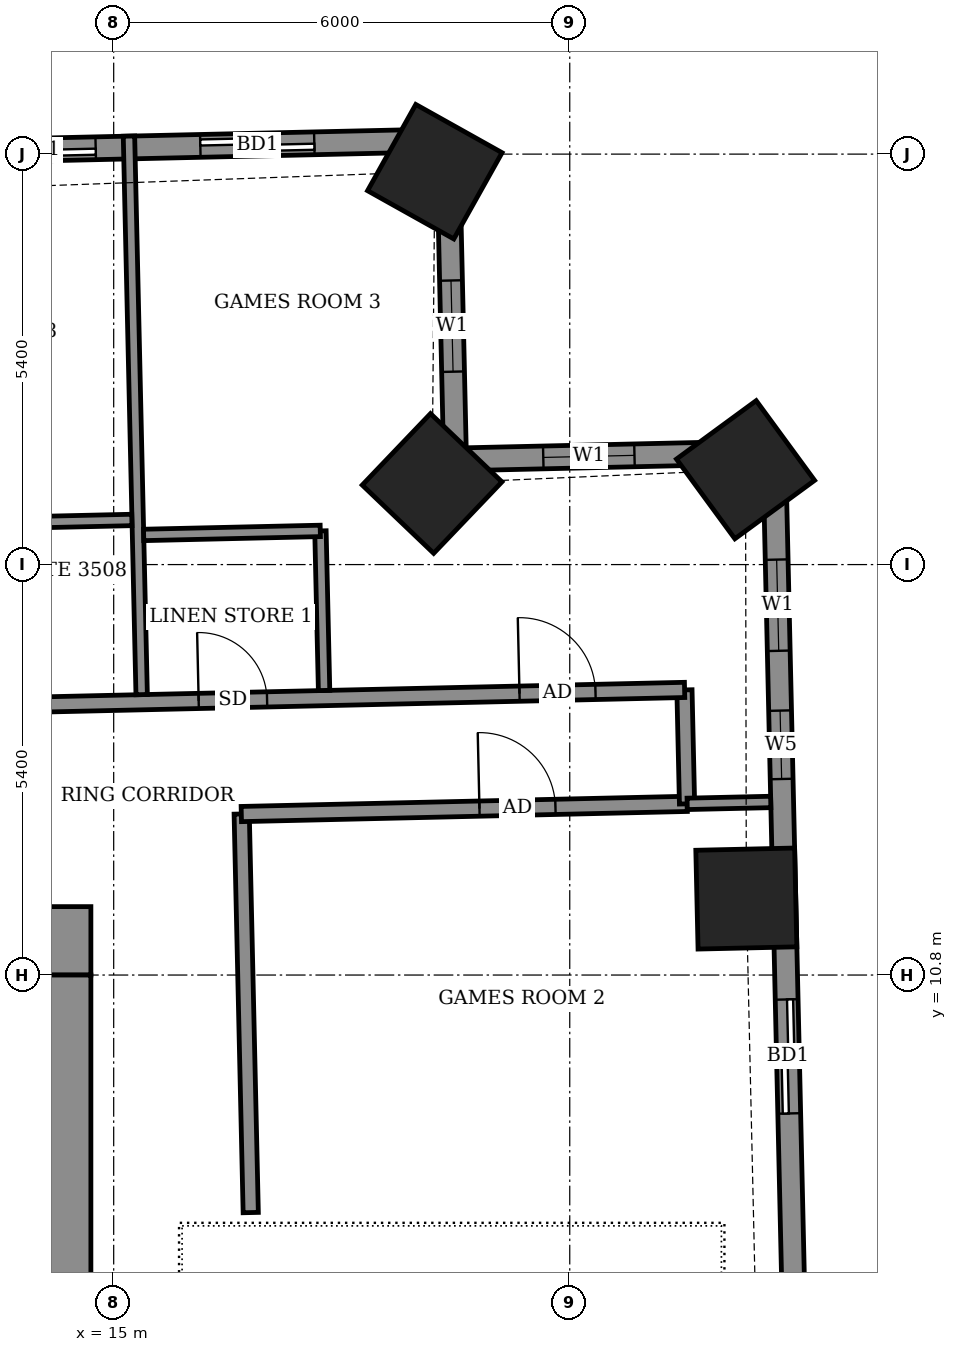
"""IFC4 building model, lengths in metres.
Left out: names, types, materials, properties, quantities, classifications, styles, units other than length and angle.
Written with IfcOpenShell. Run it as: python <this file> out.ifc"""

import sys

from ifc_helpers import new_model, si_unit, direction, frame, frame_2d, origin, origin_2d, place, context, subcontext, project, spatial, rectangle, extrude, element, fill, save


model = new_model("IFC4")
c1 = context("Model", 3, precision=1e-05, world=origin(), true_north=direction((0.0, 1.0)))
c2 = subcontext(c1, "Body", "Model", "MODEL_VIEW")
j1 = project(units=[si_unit("LENGTHUNIT", "METRE"), si_unit("PLANEANGLEUNIT", "RADIAN")], contexts=[c1])
p1 = place(None, origin())
s1 = spatial("IfcSite", under=j1, at=p1, CompositionType="ELEMENT")
p2 = place(p1, origin())
s2 = spatial("IfcBuilding", under=s1, at=p2, CompositionType="ELEMENT")
p3 = place(p2, frame((0.0, 0.0, 140.9)))
s3 = spatial("IfcBuildingStorey", under=s2, at=p3, CompositionType="ELEMENT", Elevation=140.9)
for number, where, z_axis, x_axis in (
    (1, (23.323, 11.806, -0.55), (0.0, 0.0, 1.0), (-0.023, 1.0, 0.0)),
    (2, (23.313, 17.448, -0.55), (0.0, 0.0, 1.0), (-0.591, 0.807, 0.0)),
    (3, (19.189, 17.267, -0.55), (0.0, 0.0, 1.0), (-0.723, 0.691, 0.0)),
    (4, (19.225, 21.369, -0.55), (0.0, 0.0, 1.0), (-0.873, 0.488, 0.0)),
):
    element("IfcColumn", number, at=place(p3, frame(where, z_axis=z_axis, x_axis=x_axis)), inside=s3, PredefinedType="COLUMN", context=c2, shape_type="SweptSolid", body=[
        extrude(rectangle(XDim=1.3, YDim=1.3, at=origin_2d()), origin(), (0.0, 0.0, 1.0), 3.6),
    ])
p4 = place(p3, frame((23.961, 5.752, 0.0), z_axis=(0.0, 0.0, 1.0), x_axis=(-0.022715362207, 0.999741972871, 0.0)))
e5 = element("IfcWall", 5, at=p4, inside=s3, PredefinedType="SOLIDWALL", context=c2, shape_type="SweptSolid", body=[
    extrude(rectangle(XDim=11.93, YDim=0.3, at=frame_2d((5.965, 0.0))), origin(), (0.0, 0.0, 1.0), 3.05),
])
p5 = place(p4, frame((3.228, 0.0, 0.0)))
e6 = element("IfcOpeningElement", 6, at=p5, cuts=e5, PredefinedType="OPENING", context=c2, shape_type="SweptSolid", body=[
    extrude(rectangle(XDim=1.5, YDim=2.4, at=frame_2d((0.75, 1.2))), frame((0.0, 0.16, 0.0), z_axis=(0.0, -1.0, 0.0), x_axis=(1.0, 0.0, 0.0)), (0.0, 0.0, 1.0), 0.32),
])
p6 = place(p4, frame((7.629, 0.0, 0.9)))
e7 = element("IfcOpeningElement", 7, at=p6, cuts=e5, PredefinedType="OPENING", context=c2, shape_type="SweptSolid", body=[
    extrude(rectangle(XDim=0.9, YDim=1.5, at=frame_2d((0.45, 0.75))), frame((0.0, 0.16, 0.0), z_axis=(0.0, -1.0, 0.0), x_axis=(1.0, 0.0, 0.0)), (0.0, 0.0, 1.0), 0.32),
])
p7 = place(p4, frame((9.316, 0.0, 0.9)))
e8 = element("IfcOpeningElement", 8, at=p7, cuts=e5, PredefinedType="OPENING", context=c2, shape_type="SweptSolid", body=[
    extrude(rectangle(XDim=1.2, YDim=1.5, at=frame_2d((0.6, 0.75))), frame((0.0, 0.16, 0.0), z_axis=(0.0, -1.0, 0.0), x_axis=(1.0, 0.0, 0.0)), (0.0, 0.0, 1.0), 0.32),
])
p8 = place(p3, frame((23.69, 17.679, 0.0), z_axis=(0.0, 0.0, 1.0), x_axis=(-0.999739037152, -0.022844202663, 0.0)))
e9 = element("IfcWall", 9, at=p8, inside=s3, PredefinedType="SOLIDWALL", context=c2, shape_type="SweptSolid", body=[
    extrude(rectangle(XDim=4.2, YDim=0.3, at=frame_2d((2.1, 0.0))), origin(), (0.0, 0.0, 1.0), 2.55),
])
p9 = place(p8, frame((1.839, 0.0, 0.9)))
e10 = element("IfcOpeningElement", 10, at=p9, cuts=e9, PredefinedType="OPENING", context=c2, shape_type="SweptSolid", body=[
    extrude(rectangle(XDim=1.2, YDim=1.5, at=frame_2d((0.6, 0.75))), frame((0.0, 0.16, 0.0), z_axis=(0.0, -1.0, 0.0), x_axis=(1.0, 0.0, 0.0)), (0.0, 0.0, 1.0), 0.32),
])
p10 = place(p3, frame((19.491, 17.583, 0.0), z_axis=(0.0, 0.0, 1.0), x_axis=(-0.022611811187, 0.999744320311, 0.0)))
e11 = element("IfcWall", 11, at=p10, inside=s3, PredefinedType="SOLIDWALL", context=c2, shape_type="SweptSolid", body=[
    extrude(rectangle(XDim=4.2, YDim=0.3, at=frame_2d((2.1, 0.0))), origin(), (0.0, 0.0, 1.0), 2.55),
])
p11 = place(p10, frame((1.155, 0.0, 0.9)))
e12 = element("IfcOpeningElement", 12, at=p11, cuts=e11, PredefinedType="OPENING", context=c2, shape_type="SweptSolid", body=[
    extrude(rectangle(XDim=1.2, YDim=1.5, at=frame_2d((0.6, 0.75))), frame((0.0, 0.16, 0.0), z_axis=(0.0, -1.0, 0.0), x_axis=(1.0, 0.0, 0.0)), (0.0, 0.0, 1.0), 0.32),
])
p12 = place(p3, frame((19.396, 21.782, 0.0), z_axis=(0.0, 0.0, 1.0), x_axis=(-0.999742636707, -0.022686126826, 0.0)))
e13 = element("IfcWall", 13, at=p12, inside=s3, PredefinedType="SOLIDWALL", context=c2, shape_type="SweptSolid", body=[
    extrude(rectangle(XDim=42.444, YDim=0.3, at=frame_2d((21.222, 0.0))), origin(), (0.0, 0.0, 1.0), 3.05),
])
p13 = place(p12, frame((1.757, 0.0, 0.0)))
e14 = element("IfcOpeningElement", 14, at=p13, cuts=e13, PredefinedType="OPENING", context=c2, shape_type="SweptSolid", body=[
    extrude(rectangle(XDim=1.5, YDim=2.4, at=frame_2d((0.75, 1.2))), frame((0.0, 0.16, 0.0), z_axis=(0.0, -1.0, 0.0), x_axis=(1.0, 0.0, 0.0)), (0.0, 0.0, 1.0), 0.32),
])
p14 = place(p12, frame((4.634, 0.0, 0.0)))
e15 = element("IfcOpeningElement", 15, at=p14, cuts=e13, PredefinedType="OPENING", context=c2, shape_type="SweptSolid", body=[
    extrude(rectangle(XDim=1.5, YDim=2.4, at=frame_2d((0.75, 1.2))), frame((0.0, 0.16, 0.0), z_axis=(0.0, -1.0, 0.0), x_axis=(1.0, 0.0, 0.0)), (0.0, 0.0, 1.0), 0.32),
])
p15 = place(p12, frame((9.769, 0.0, 0.0)))
e16 = element("IfcOpeningElement", 16, at=p15, cuts=e13, PredefinedType="OPENING", context=c2, shape_type="SweptSolid", body=[
    extrude(rectangle(XDim=1.5, YDim=2.4, at=frame_2d((0.75, 1.2))), frame((0.0, 0.16, 0.0), z_axis=(0.0, -1.0, 0.0), x_axis=(1.0, 0.0, 0.0)), (0.0, 0.0, 1.0), 0.32),
])
p16 = place(p12, frame((14.946, 0.0, 0.0)))
e17 = element("IfcOpeningElement", 17, at=p16, cuts=e13, PredefinedType="OPENING", context=c2, shape_type="SweptSolid", body=[
    extrude(rectangle(XDim=1.5, YDim=2.4, at=frame_2d((0.75, 1.2))), frame((0.0, 0.16, 0.0), z_axis=(0.0, -1.0, 0.0), x_axis=(1.0, 0.0, 0.0)), (0.0, 0.0, 1.0), 0.32),
])
p17 = place(p12, frame((18.108, 0.0, 0.0)))
e18 = element("IfcOpeningElement", 18, at=p17, cuts=e13, PredefinedType="OPENING", context=c2, shape_type="SweptSolid", body=[
    extrude(rectangle(XDim=1.5, YDim=2.4, at=frame_2d((0.75, 1.2))), frame((0.0, 0.16, 0.0), z_axis=(0.0, -1.0, 0.0), x_axis=(1.0, 0.0, 0.0)), (0.0, 0.0, 1.0), 0.32),
])
p18 = place(p12, frame((22.733, 0.0, 0.0)))
e19 = element("IfcOpeningElement", 19, at=p18, cuts=e13, PredefinedType="OPENING", context=c2, shape_type="SweptSolid", body=[
    extrude(rectangle(XDim=1.5, YDim=2.4, at=frame_2d((0.75, 1.2))), frame((0.0, 0.16, 0.0), z_axis=(0.0, -1.0, 0.0), x_axis=(1.0, 0.0, 0.0)), (0.0, 0.0, 1.0), 0.32),
])
p19 = place(p12, frame((25.895, 0.0, 0.0)))
e20 = element("IfcOpeningElement", 20, at=p19, cuts=e13, PredefinedType="OPENING", context=c2, shape_type="SweptSolid", body=[
    extrude(rectangle(XDim=1.5, YDim=2.4, at=frame_2d((0.75, 1.2))), frame((0.0, 0.16, 0.0), z_axis=(0.0, -1.0, 0.0), x_axis=(1.0, 0.0, 0.0)), (0.0, 0.0, 1.0), 0.32),
])
p20 = place(p12, frame((30.944, 0.0, 0.0)))
e21 = element("IfcOpeningElement", 21, at=p20, cuts=e13, PredefinedType="OPENING", context=c2, shape_type="SweptSolid", body=[
    extrude(rectangle(XDim=1.5, YDim=2.4, at=frame_2d((0.75, 1.2))), frame((0.0, 0.16, 0.0), z_axis=(0.0, -1.0, 0.0), x_axis=(1.0, 0.0, 0.0)), (0.0, 0.0, 1.0), 0.32),
])
p21 = place(p12, frame((36.232, 0.0, 0.0)))
e22 = element("IfcOpeningElement", 22, at=p21, cuts=e13, PredefinedType="OPENING", context=c2, shape_type="SweptSolid", body=[
    extrude(rectangle(XDim=1.5, YDim=2.4, at=frame_2d((0.75, 1.2))), frame((0.0, 0.16, 0.0), z_axis=(0.0, -1.0, 0.0), x_axis=(1.0, 0.0, 0.0)), (0.0, 0.0, 1.0), 0.32),
])
p22 = place(p12, frame((38.612, 0.0, 0.9)))
e23 = element("IfcOpeningElement", 23, at=p22, cuts=e13, PredefinedType="OPENING", context=c2, shape_type="SweptSolid", body=[
    extrude(rectangle(XDim=2.4, YDim=1.5, at=frame_2d((1.2, 0.75))), frame((0.0, 0.16, 0.0), z_axis=(0.0, -1.0, 0.0), x_axis=(1.0, 0.0, 0.0)), (0.0, 0.0, 1.0), 0.32),
])
p23 = place(p3, frame((16.803, 7.675, 0.0), z_axis=(0.0, 0.0, 1.0), x_axis=(-0.022667483124, 0.999743059595, 0.0)))
e24 = element("IfcWall", 24, at=p23, inside=s3, PredefinedType="PARTITIONING", context=c2, shape_type="SweptSolid", body=[
    extrude(rectangle(XDim=5.245, YDim=0.2, at=frame_2d((2.623, 0.0))), origin(), (0.0, 0.0, 1.0), 3.05),
])
p24 = place(p3, frame((16.679, 12.918, 0.0), z_axis=(0.0, 0.0, 1.0), x_axis=(0.999739057042, 0.022843332181, 0.0)))
e25 = element("IfcWall", 25, at=p24, inside=s3, PredefinedType="PARTITIONING", context=c2, shape_type="SweptSolid", body=[
    extrude(rectangle(XDim=5.867, YDim=0.2, at=frame_2d((2.934, 0.0))), origin(), (0.0, 0.0, 1.0), 3.05),
])
p25 = place(p24, frame((3.134, 0.0, 0.0)))
e26 = element("IfcOpeningElement", 26, at=p25, cuts=e25, PredefinedType="OPENING", context=c2, shape_type="SweptSolid", body=[
    extrude(rectangle(XDim=1.0, YDim=2.1, at=frame_2d((0.5, 1.05))), frame((0.0, 0.11, 0.0), z_axis=(0.0, -1.0, 0.0), x_axis=(1.0, 0.0, 0.0)), (0.0, 0.0, 1.0), 0.22),
])
p26 = place(p3, frame((22.543, 13.052, 0.0), z_axis=(0.0, 0.0, 1.0), x_axis=(-0.022632637625, 0.99974384905, 0.0)))
e27 = element("IfcWall", 27, at=p26, inside=s3, PredefinedType="PARTITIONING", context=c2, shape_type="SweptSolid", body=[
    extrude(rectangle(XDim=1.5, YDim=0.2, at=frame_2d((0.75, 0.0))), origin(), (0.0, 0.0, 1.0), 3.05),
])
p27 = place(p3, frame((22.545, 13.052, 0.0), z_axis=(0.0, 0.0, 1.0), x_axis=(0.999743438074, 0.022650784248, 0.0)))
e28 = element("IfcWall", 28, at=p27, inside=s3, PredefinedType="PARTITIONING", context=c2, shape_type="SweptSolid", body=[
    extrude(rectangle(XDim=1.099, YDim=0.15, at=frame_2d((0.55, 0.0))), origin(), (0.0, 0.0, 1.0), 2.55),
])
p28 = place(p3, frame((-26.421, 13.441, 0.0), z_axis=(0.0, 0.0, 1.0), x_axis=(0.999742754064, 0.022680954485, 0.0)))
e29 = element("IfcWall", 29, at=p28, inside=s3, PredefinedType="PARTITIONING", context=c2, shape_type="SweptSolid", body=[
    extrude(rectangle(XDim=48.945, YDim=0.2, at=frame_2d((24.472, 0.0))), origin(), (0.0, 0.0, 1.0), 3.05),
])
p29 = place(p28, frame((46.772, 0.0, 0.0)))
e30 = element("IfcOpeningElement", 30, at=p29, cuts=e29, PredefinedType="OPENING", context=c2, shape_type="SweptSolid", body=[
    extrude(rectangle(XDim=1.0, YDim=2.1, at=frame_2d((0.5, 1.05))), frame((0.0, 0.11, 0.0), z_axis=(0.0, -1.0, 0.0), x_axis=(1.0, 0.0, 0.0)), (0.0, 0.0, 1.0), 0.22),
])
p30 = place(p28, frame((42.55, 0.0, 0.0)))
e31 = element("IfcOpeningElement", 31, at=p30, cuts=e29, PredefinedType="OPENING", context=c2, shape_type="SweptSolid", body=[
    extrude(rectangle(XDim=0.9, YDim=2.1, at=frame_2d((0.45, 1.05))), frame((0.0, 0.11, 0.0), z_axis=(0.0, -1.0, 0.0), x_axis=(1.0, 0.0, 0.0)), (0.0, 0.0, 1.0), 0.22),
])
p31 = place(p28, frame((38.05, 0.0, 0.0)))
e32 = element("IfcOpeningElement", 32, at=p31, cuts=e29, PredefinedType="OPENING", context=c2, shape_type="SweptSolid", body=[
    extrude(rectangle(XDim=0.9, YDim=2.1, at=frame_2d((0.45, 1.05))), frame((0.0, 0.11, 0.0), z_axis=(0.0, -1.0, 0.0), x_axis=(1.0, 0.0, 0.0)), (0.0, 0.0, 1.0), 0.22),
])
p32 = place(p28, frame((36.225, 0.0, 0.0)))
e33 = element("IfcOpeningElement", 33, at=p32, cuts=e29, PredefinedType="OPENING", context=c2, shape_type="SweptSolid", body=[
    extrude(rectangle(XDim=0.9, YDim=2.1, at=frame_2d((0.45, 1.05))), frame((0.0, 0.11, 0.0), z_axis=(0.0, -1.0, 0.0), x_axis=(1.0, 0.0, 0.0)), (0.0, 0.0, 1.0), 0.22),
])
p33 = place(p28, frame((29.575, 0.0, 0.0)))
e34 = element("IfcOpeningElement", 34, at=p33, cuts=e29, PredefinedType="OPENING", context=c2, shape_type="SweptSolid", body=[
    extrude(rectangle(XDim=0.9, YDim=2.1, at=frame_2d((0.45, 1.05))), frame((0.0, 0.11, 0.0), z_axis=(0.0, -1.0, 0.0), x_axis=(1.0, 0.0, 0.0)), (0.0, 0.0, 1.0), 0.22),
])
p34 = place(p28, frame((27.75, 0.0, 0.0)))
e35 = element("IfcOpeningElement", 35, at=p34, cuts=e29, PredefinedType="OPENING", context=c2, shape_type="SweptSolid", body=[
    extrude(rectangle(XDim=0.9, YDim=2.1, at=frame_2d((0.45, 1.05))), frame((0.0, 0.11, 0.0), z_axis=(0.0, -1.0, 0.0), x_axis=(1.0, 0.0, 0.0)), (0.0, 0.0, 1.0), 0.22),
])
p35 = place(p28, frame((21.125, 0.0, 0.0)))
e36 = element("IfcOpeningElement", 36, at=p35, cuts=e29, PredefinedType="OPENING", context=c2, shape_type="SweptSolid", body=[
    extrude(rectangle(XDim=0.9, YDim=2.1, at=frame_2d((0.45, 1.05))), frame((0.0, 0.11, 0.0), z_axis=(0.0, -1.0, 0.0), x_axis=(1.0, 0.0, 0.0)), (0.0, 0.0, 1.0), 0.22),
])
p36 = place(p28, frame((19.275, 0.0, 0.0)))
e37 = element("IfcOpeningElement", 37, at=p36, cuts=e29, PredefinedType="OPENING", context=c2, shape_type="SweptSolid", body=[
    extrude(rectangle(XDim=0.9, YDim=2.1, at=frame_2d((0.45, 1.05))), frame((0.0, 0.11, 0.0), z_axis=(0.0, -1.0, 0.0), x_axis=(1.0, 0.0, 0.0)), (0.0, 0.0, 1.0), 0.22),
])
p37 = place(p28, frame((12.65, 0.0, 0.0)))
e38 = element("IfcOpeningElement", 38, at=p37, cuts=e29, PredefinedType="OPENING", context=c2, shape_type="SweptSolid", body=[
    extrude(rectangle(XDim=0.9, YDim=2.1, at=frame_2d((0.45, 1.05))), frame((0.0, 0.11, 0.0), z_axis=(0.0, -1.0, 0.0), x_axis=(1.0, 0.0, 0.0)), (0.0, 0.0, 1.0), 0.22),
])
p38 = place(p28, frame((10.8, 0.0, 0.0)))
e39 = element("IfcOpeningElement", 39, at=p38, cuts=e29, PredefinedType="OPENING", context=c2, shape_type="SweptSolid", body=[
    extrude(rectangle(XDim=0.9, YDim=2.1, at=frame_2d((0.45, 1.05))), frame((0.0, 0.11, 0.0), z_axis=(0.0, -1.0, 0.0), x_axis=(1.0, 0.0, 0.0)), (0.0, 0.0, 1.0), 0.22),
])
p39 = place(p28, frame((1.55, 0.0, 0.0)))
e40 = element("IfcOpeningElement", 40, at=p39, cuts=e29, PredefinedType="OPENING", context=c2, shape_type="SweptSolid", body=[
    extrude(rectangle(XDim=1.0, YDim=2.1, at=frame_2d((0.5, 1.05))), frame((0.0, 0.11, 0.0), z_axis=(0.0, -1.0, 0.0), x_axis=(1.0, 0.0, 0.0)), (0.0, 0.0, 1.0), 0.22),
])
p40 = place(p28, frame((6.25, 0.0, 0.0)))
e41 = element("IfcOpeningElement", 41, at=p40, cuts=e29, PredefinedType="OPENING", context=c2, shape_type="SweptSolid", body=[
    extrude(rectangle(XDim=0.9, YDim=2.1, at=frame_2d((0.45, 1.05))), frame((0.0, 0.11, 0.0), z_axis=(0.0, -1.0, 0.0), x_axis=(1.0, 0.0, 0.0)), (0.0, 0.0, 1.0), 0.22),
])
p41 = place(p3, frame((15.368, 14.489, 0.0), z_axis=(0.0, 0.0, 1.0), x_axis=(-0.022720650804, 0.999741852694, 0.0)))
e42 = element("IfcWall", 42, at=p41, inside=s3, PredefinedType="PARTITIONING", context=c2, shape_type="SweptSolid", body=[
    extrude(rectangle(XDim=7.35, YDim=0.15, at=frame_2d((3.675, 0.0))), origin(), (0.0, 0.0, 1.0), 2.55),
])
p42 = place(p3, frame((17.768, 14.544, 0.0), z_axis=(0.0, 0.0, 1.0), x_axis=(-0.022906293375, 0.999737616439, 0.0)))
e43 = element("IfcWall", 43, at=p42, inside=s3, PredefinedType="PARTITIONING", context=c2, shape_type="SweptSolid", body=[
    extrude(rectangle(XDim=2.1, YDim=0.15, at=frame_2d((1.05, 0.0))), origin(), (0.0, 0.0, 1.0), 3.05),
])
for number, where, z_axis, x_axis in (
    (44, (15.394, 16.59, 0.0), (0.0, 0.0, 1.0), (1.0, 0.023, 0.0)),
    (45, (12.915, 16.734, 0.0), (0.0, 0.0, 1.0), (1.0, 0.023, 0.0)),
):
    element("IfcWall", number, at=place(p3, frame(where, z_axis=z_axis, x_axis=x_axis)), inside=s3, PredefinedType="PARTITIONING", context=c2, shape_type="SweptSolid", body=[
        extrude(rectangle(XDim=2.324, YDim=0.15, at=frame_2d((1.162, 0.0))), origin(), (0.0, 0.0, 1.0), 3.05),
    ])
p43 = place(p3, frame((-14.7, 11.25, 0.0), z_axis=(0.0, 0.0, 1.0), x_axis=(1.0, 0.0, 0.0)))
e46 = element("IfcWall", 46, at=p43, inside=s3, PredefinedType="SHEAR", context=c2, shape_type="SweptSolid", body=[
    extrude(rectangle(XDim=29.4, YDim=0.9, at=frame_2d((14.7, 0.0))), origin(), (0.0, 0.0, 1.0), 3.6),
])
p44 = place(p3, frame((14.25, -10.8, 0.0), z_axis=(0.0, 0.0, 1.0), x_axis=(0.0, 1.0, 0.0)))
e47 = element("IfcWall", 47, at=p44, inside=s3, PredefinedType="SHEAR", context=c2, shape_type="SweptSolid", body=[
    extrude(rectangle(XDim=21.6, YDim=0.9, at=frame_2d((10.8, 0.0))), origin(), (0.0, 0.0, 1.0), 3.6),
])
p45 = place(p44, frame((1.2, 0.0, 0.0)))
e48 = element("IfcOpeningElement", 48, at=p45, cuts=e47, PredefinedType="OPENING", context=c2, shape_type="SweptSolid", body=[
    extrude(rectangle(XDim=1.2, YDim=2.1, at=frame_2d((0.6, 1.05))), frame((0.0, 0.46, 0.0), z_axis=(0.0, -1.0, 0.0), x_axis=(1.0, 0.0, 0.0)), (0.0, 0.0, 1.0), 0.92),
])
p46 = place(p5, origin())
e49 = element("IfcDoor", 49, at=p46, inside=s3, OperationType="SLIDING_TO_LEFT", PredefinedType="DOOR", context=c2, shape_type="SweptSolid", body=[
    extrude(rectangle(XDim=1.5, YDim=2.4, at=frame_2d((0.75, 1.2))), frame((0.0, 0.025, 0.0), z_axis=(0.0, -1.0, 0.0), x_axis=(1.0, 0.0, 0.0)), (0.0, 0.0, 1.0), 0.05),
])
fill(e6, e49)
p47 = place(p6, origin())
e50 = element("IfcWindow", 50, at=p47, inside=s3, PartitioningType="SINGLE_PANEL", PredefinedType="WINDOW", context=c2, shape_type="SweptSolid", body=[
    extrude(rectangle(XDim=0.9, YDim=1.5, at=frame_2d((0.45, 0.75))), frame((0.0, 0.03, 0.0), z_axis=(0.0, -1.0, 0.0), x_axis=(1.0, 0.0, 0.0)), (0.0, 0.0, 1.0), 0.06),
])
fill(e7, e50)
p48 = place(p7, origin())
e51 = element("IfcWindow", 51, at=p48, inside=s3, PartitioningType="SINGLE_PANEL", PredefinedType="WINDOW", context=c2, shape_type="SweptSolid", body=[
    extrude(rectangle(XDim=1.2, YDim=1.5, at=frame_2d((0.6, 0.75))), frame((0.0, 0.03, 0.0), z_axis=(0.0, -1.0, 0.0), x_axis=(1.0, 0.0, 0.0)), (0.0, 0.0, 1.0), 0.06),
])
fill(e8, e51)
p49 = place(p9, origin())
e52 = element("IfcWindow", 52, at=p49, inside=s3, PartitioningType="SINGLE_PANEL", PredefinedType="WINDOW", context=c2, shape_type="SweptSolid", body=[
    extrude(rectangle(XDim=1.2, YDim=1.5, at=frame_2d((0.6, 0.75))), frame((0.0, 0.03, 0.0), z_axis=(0.0, -1.0, 0.0), x_axis=(1.0, 0.0, 0.0)), (0.0, 0.0, 1.0), 0.06),
])
fill(e10, e52)
p50 = place(p11, origin())
e53 = element("IfcWindow", 53, at=p50, inside=s3, PartitioningType="SINGLE_PANEL", PredefinedType="WINDOW", context=c2, shape_type="SweptSolid", body=[
    extrude(rectangle(XDim=1.2, YDim=1.5, at=frame_2d((0.6, 0.75))), frame((0.0, 0.03, 0.0), z_axis=(0.0, -1.0, 0.0), x_axis=(1.0, 0.0, 0.0)), (0.0, 0.0, 1.0), 0.06),
])
fill(e12, e53)
p51 = place(p13, origin())
e54 = element("IfcDoor", 54, at=p51, inside=s3, OperationType="SLIDING_TO_LEFT", PredefinedType="DOOR", context=c2, shape_type="SweptSolid", body=[
    extrude(rectangle(XDim=1.5, YDim=2.4, at=frame_2d((0.75, 1.2))), frame((0.0, 0.025, 0.0), z_axis=(0.0, -1.0, 0.0), x_axis=(1.0, 0.0, 0.0)), (0.0, 0.0, 1.0), 0.05),
])
fill(e14, e54)
p52 = place(p14, origin())
e55 = element("IfcDoor", 55, at=p52, inside=s3, OperationType="SLIDING_TO_LEFT", PredefinedType="DOOR", context=c2, shape_type="SweptSolid", body=[
    extrude(rectangle(XDim=1.5, YDim=2.4, at=frame_2d((0.75, 1.2))), frame((0.0, 0.025, 0.0), z_axis=(0.0, -1.0, 0.0), x_axis=(1.0, 0.0, 0.0)), (0.0, 0.0, 1.0), 0.05),
])
fill(e15, e55)
p53 = place(p25, origin())
e56 = element("IfcDoor", 56, at=p53, inside=s3, OperationType="SINGLE_SWING_LEFT", PredefinedType="DOOR", context=c2, shape_type="SweptSolid", body=[
    extrude(rectangle(XDim=1.0, YDim=2.1, at=frame_2d((0.5, 1.05))), frame((0.0, 0.025, 0.0), z_axis=(0.0, -1.0, 0.0), x_axis=(1.0, 0.0, 0.0)), (0.0, 0.0, 1.0), 0.05),
])
fill(e26, e56)
p54 = place(p29, origin())
e57 = element("IfcDoor", 57, at=p54, inside=s3, OperationType="SINGLE_SWING_RIGHT", PredefinedType="DOOR", context=c2, shape_type="SweptSolid", body=[
    extrude(rectangle(XDim=1.0, YDim=2.1, at=frame_2d((0.5, 1.05))), frame((0.0, 0.025, 0.0), z_axis=(0.0, -1.0, 0.0), x_axis=(1.0, 0.0, 0.0)), (0.0, 0.0, 1.0), 0.05),
])
fill(e30, e57)
p55 = place(p30, origin())
e58 = element("IfcDoor", 58, at=p55, inside=s3, OperationType="SINGLE_SWING_LEFT", PredefinedType="DOOR", context=c2, shape_type="SweptSolid", body=[
    extrude(rectangle(XDim=0.9, YDim=2.1, at=frame_2d((0.45, 1.05))), frame((0.0, 0.025, 0.0), z_axis=(0.0, -1.0, 0.0), x_axis=(1.0, 0.0, 0.0)), (0.0, 0.0, 1.0), 0.05),
])
fill(e31, e58)
save(model, sys.argv[1])
